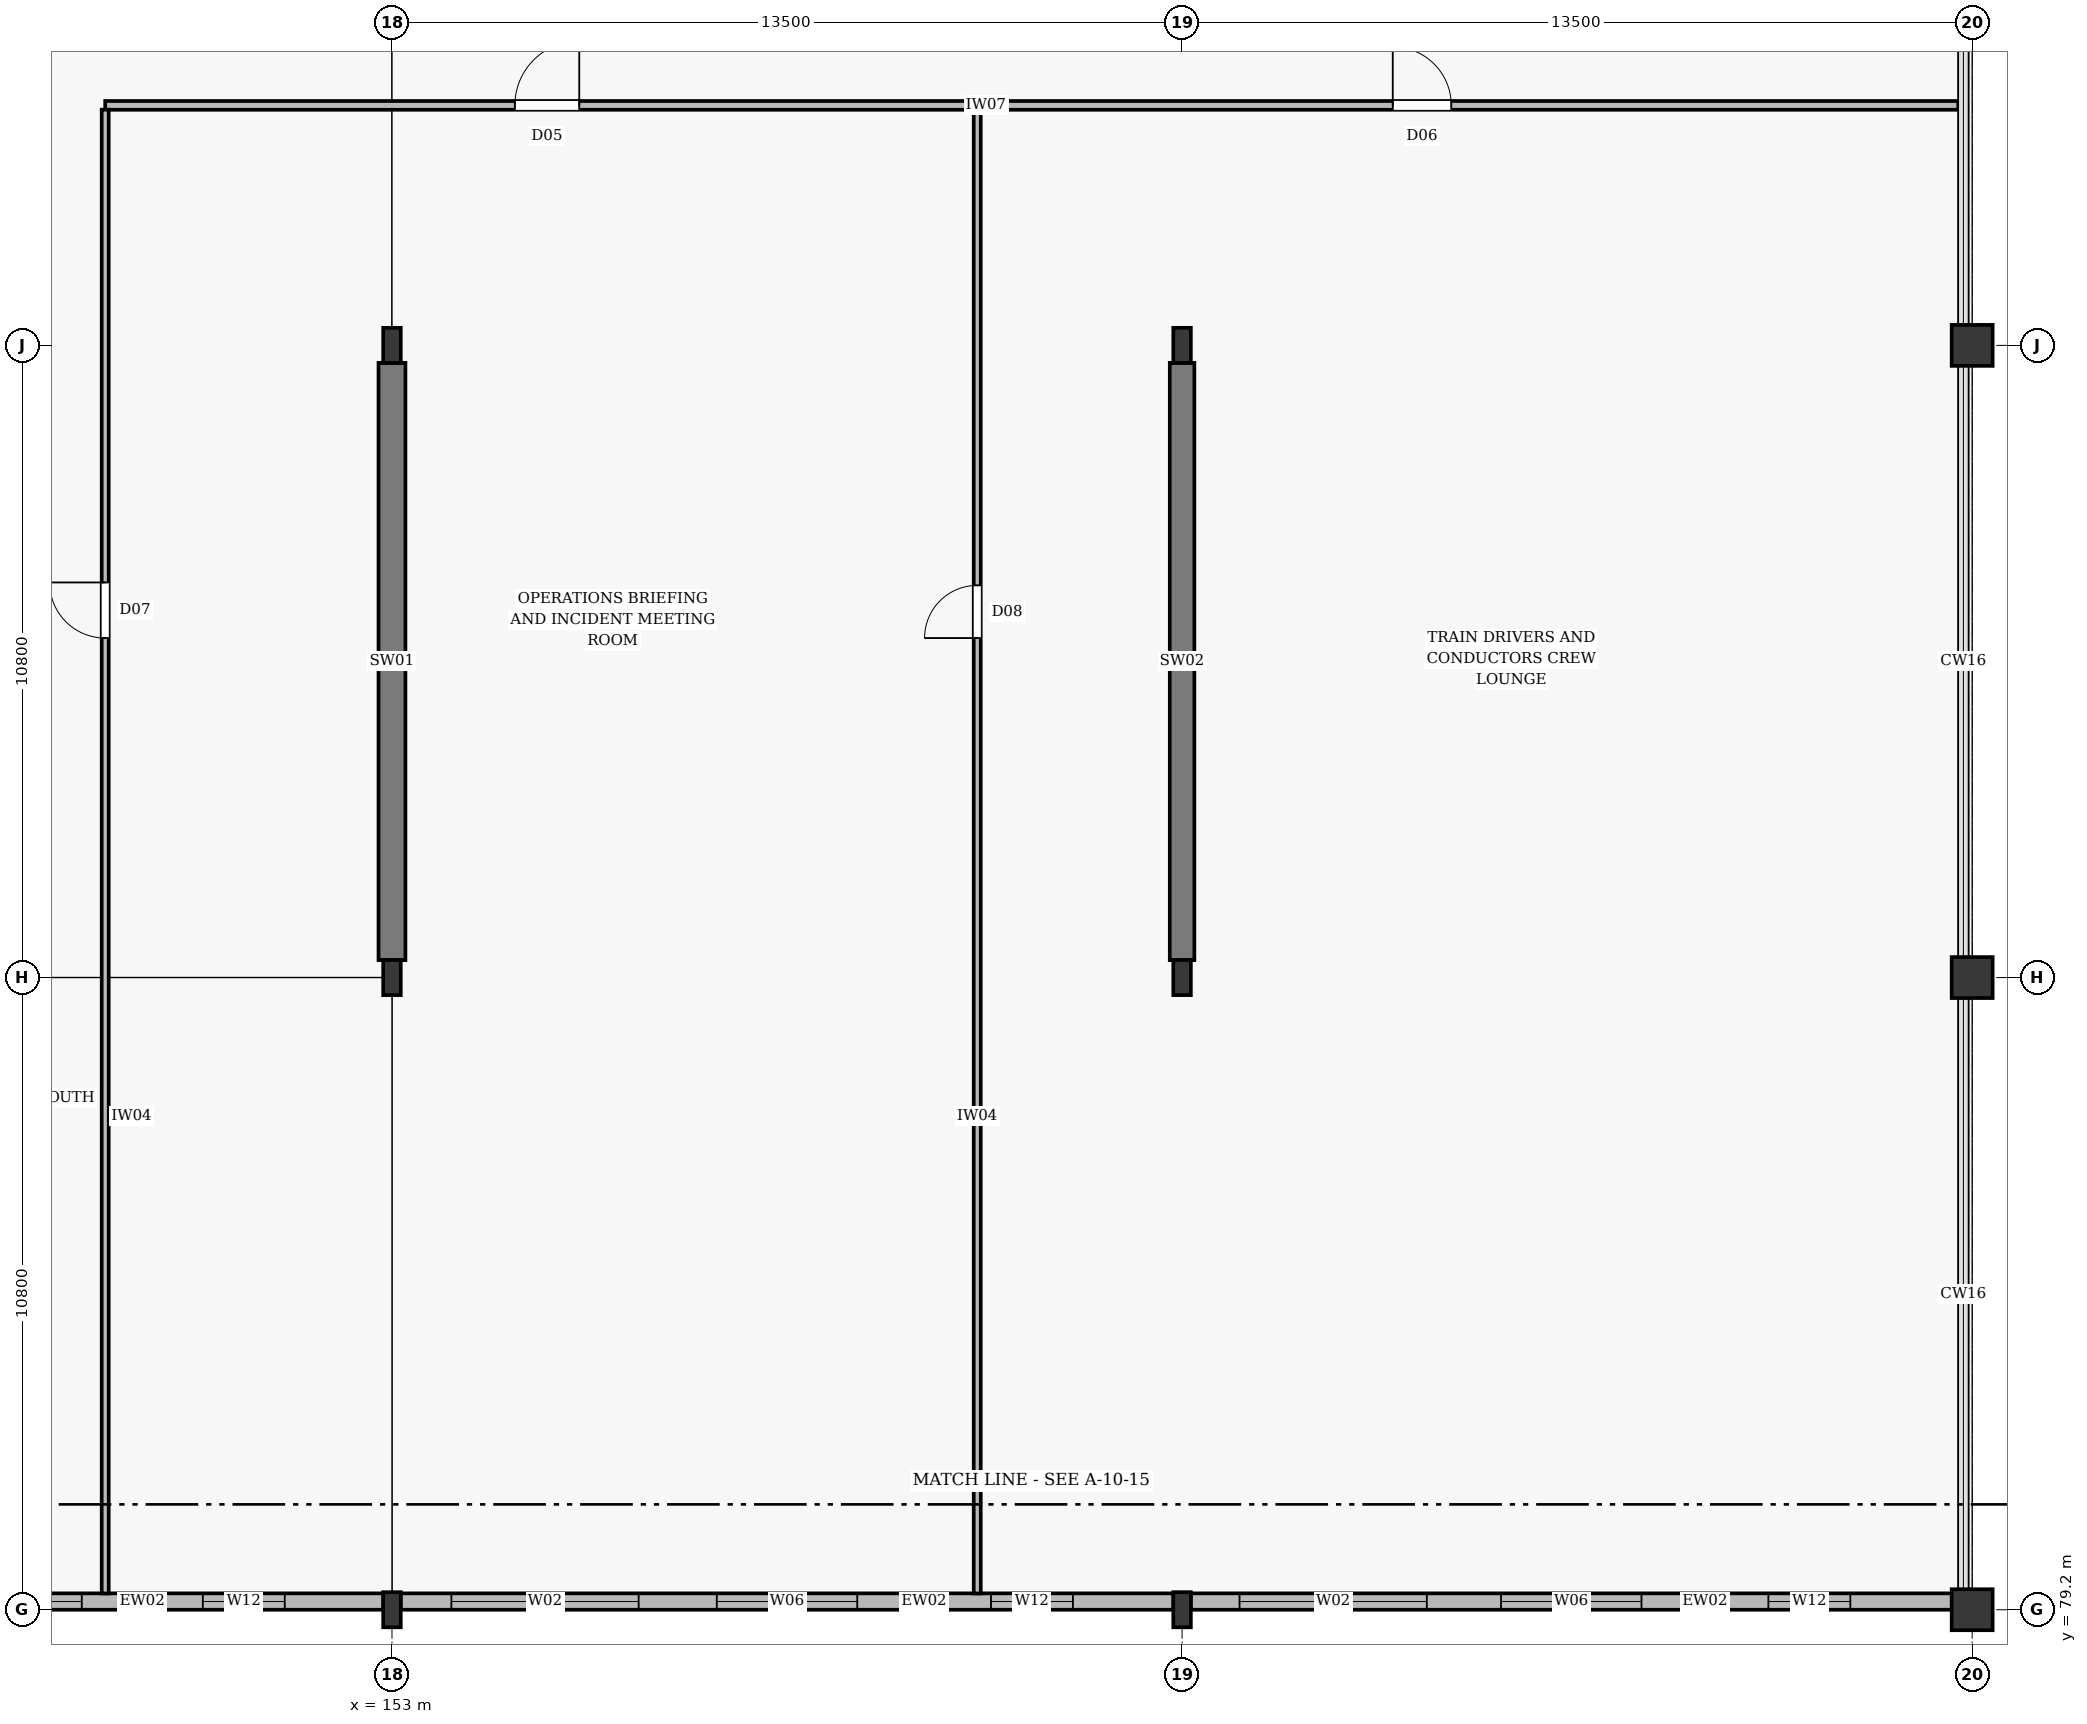
"""IFC4 building model, lengths in metres.
Left out: names, types, materials, properties, quantities, classifications, styles, units other than length and angle.
Written with IfcOpenShell. Run it as: python <this file> out.ifc"""

import sys

from ifc_helpers import new_model, si_unit, direction, frame, frame_2d, origin, origin_2d, place, context, subcontext, project, spatial, rectangle, i_section, extrude, element, fill, save


model = new_model("IFC4")
c1 = context("Model", 3, precision=1e-05, world=origin(), true_north=direction((0.0, 1.0)))
c2 = subcontext(c1, "Body", "Model", "MODEL_VIEW")
j1 = project(units=[si_unit("LENGTHUNIT", "METRE"), si_unit("PLANEANGLEUNIT", "RADIAN")], contexts=[c1])
p1 = place(None, origin())
s1 = spatial("IfcSite", under=j1, at=p1, CompositionType="ELEMENT")
p2 = place(p1, origin())
s2 = spatial("IfcBuilding", under=s1, at=p2, CompositionType="ELEMENT")
p3 = place(p2, frame((0.0, 0.0, 6.6)))
s3 = spatial("IfcBuildingStorey", under=s2, at=p3, CompositionType="ELEMENT", Elevation=6.6)
for number, where, z_axis, x_axis in (
    (1, (153.0, 79.2, 0.0), (0.0, 0.0, 1.0), (1.0, 0.0, 0.0)),
    (2, (153.0, 90.0, 0.0), (0.0, 0.0, 1.0), (1.0, 0.0, 0.0)),
    (3, (153.0, 100.8, 0.0), (0.0, 0.0, 1.0), (1.0, 0.0, 0.0)),
    (4, (166.5, 79.2, 0.0), (0.0, 0.0, 1.0), (1.0, 0.0, 0.0)),
    (5, (166.5, 90.0, 0.0), (0.0, 0.0, 1.0), (1.0, 0.0, 0.0)),
    (6, (166.5, 100.8, 0.0), (0.0, 0.0, 1.0), (1.0, 0.0, 0.0)),
):
    element("IfcColumn", number, at=place(p3, frame(where, z_axis=z_axis, x_axis=x_axis)), inside=s3, PredefinedType="COLUMN", context=c2, shape_type="SweptSolid", body=[
        extrude(i_section(OverallWidth=0.3, OverallDepth=0.6, WebThickness=0.015, FlangeThickness=0.029, at=origin_2d()), origin(), (0.0, 0.0, 1.0), 6.0),
    ])
for number, where, z_axis, x_axis in (
    (7, (180.0, 79.2, 0.0), (0.0, 0.0, 1.0), (1.0, 0.0, 0.0)),
    (8, (180.0, 90.0, 0.0), (0.0, 0.0, 1.0), (1.0, 0.0, 0.0)),
    (9, (180.0, 100.8, 0.0), (0.0, 0.0, 1.0), (1.0, 0.0, 0.0)),
):
    element("IfcColumn", number, at=place(p3, frame(where, z_axis=z_axis, x_axis=x_axis)), inside=s3, PredefinedType="COLUMN", context=c2, shape_type="SweptSolid", body=[
        extrude(rectangle(XDim=0.7, YDim=0.7, at=origin_2d()), origin(), (0.0, 0.0, 1.0), 6.0),
    ])
p4 = place(p3, frame((153.0, 90.298, 0.0), z_axis=(0.0, 0.0, 1.0), x_axis=(0.0, 1.0, 0.0)))
e10 = element("IfcWall", 10, at=p4, inside=s3, PredefinedType="SHEAR", context=c2, shape_type="SweptSolid", body=[
    extrude(rectangle(XDim=10.204, YDim=0.46, at=frame_2d((5.102, 0.0))), origin(), (0.0, 0.0, 1.0), 5.75),
])
p5 = place(p3, frame((166.5, 90.298, 0.0), z_axis=(0.0, 0.0, 1.0), x_axis=(0.0, 1.0, 0.0)))
e11 = element("IfcWall", 11, at=p5, inside=s3, PredefinedType="SHEAR", context=c2, shape_type="SweptSolid", body=[
    extrude(rectangle(XDim=10.204, YDim=0.42, at=frame_2d((5.102, 0.0))), origin(), (0.0, 0.0, 1.0), 5.75),
])
p6 = place(p3, frame((140.148, 79.34, 0.0), z_axis=(0.0, 0.0, 1.0), x_axis=(1.0, 0.0, 0.0)))
e12 = element("IfcWall", 12, at=p6, inside=s3, PredefinedType="STANDARD", context=c2, shape_type="SweptSolid", body=[
    extrude(rectangle(XDim=12.704, YDim=0.28, at=frame_2d((6.352, 0.0))), origin(), (0.0, 0.0, 1.0), 5.09),
])
p7 = place(p6, frame((0.684, 0.0, 0.75)))
e13 = element("IfcOpeningElement", 13, at=p7, cuts=e12, PredefinedType="OPENING", context=c2, shape_type="SweptSolid", body=[
    extrude(rectangle(XDim=3.2, YDim=2.8, at=frame_2d((1.6, 1.4))), frame((0.0, 0.152, 0.0), z_axis=(0.0, -1.0, 0.0), x_axis=(1.0, 0.0, 0.0)), (0.0, 0.0, 1.0), 0.304),
])
p8 = place(p6, frame((5.152, 0.0, 0.75)))
e14 = element("IfcOpeningElement", 14, at=p8, cuts=e12, PredefinedType="OPENING", context=c2, shape_type="SweptSolid", body=[
    extrude(rectangle(XDim=2.4, YDim=2.4, at=frame_2d((1.2, 1.2))), frame((0.0, 0.152, 0.0), z_axis=(0.0, -1.0, 0.0), x_axis=(1.0, 0.0, 0.0)), (0.0, 0.0, 1.0), 0.304),
])
p9 = place(p6, frame((9.62, 0.0, 1.05)))
e15 = element("IfcOpeningElement", 15, at=p9, cuts=e12, PredefinedType="OPENING", context=c2, shape_type="SweptSolid", body=[
    extrude(rectangle(XDim=1.4, YDim=1.8, at=frame_2d((0.7, 0.9))), frame((0.0, 0.152, 0.0), z_axis=(0.0, -1.0, 0.0), x_axis=(1.0, 0.0, 0.0)), (0.0, 0.0, 1.0), 0.304),
])
p10 = place(p3, frame((153.148, 79.34, 0.0), z_axis=(0.0, 0.0, 1.0), x_axis=(1.0, 0.0, 0.0)))
e16 = element("IfcWall", 16, at=p10, inside=s3, PredefinedType="STANDARD", context=c2, shape_type="SweptSolid", body=[
    extrude(rectangle(XDim=13.204, YDim=0.28, at=frame_2d((6.602, 0.0))), origin(), (0.0, 0.0, 1.0), 5.09),
])
p11 = place(p10, frame((0.867, 0.0, 0.75)))
e17 = element("IfcOpeningElement", 17, at=p11, cuts=e16, PredefinedType="OPENING", context=c2, shape_type="SweptSolid", body=[
    extrude(rectangle(XDim=3.2, YDim=2.8, at=frame_2d((1.6, 1.4))), frame((0.0, 0.152, 0.0), z_axis=(0.0, -1.0, 0.0), x_axis=(1.0, 0.0, 0.0)), (0.0, 0.0, 1.0), 0.304),
])
p12 = place(p10, frame((5.402, 0.0, 0.75)))
e18 = element("IfcOpeningElement", 18, at=p12, cuts=e16, PredefinedType="OPENING", context=c2, shape_type="SweptSolid", body=[
    extrude(rectangle(XDim=2.4, YDim=2.4, at=frame_2d((1.2, 1.2))), frame((0.0, 0.152, 0.0), z_axis=(0.0, -1.0, 0.0), x_axis=(1.0, 0.0, 0.0)), (0.0, 0.0, 1.0), 0.304),
])
p13 = place(p10, frame((10.087, 0.0, 1.05)))
e19 = element("IfcOpeningElement", 19, at=p13, cuts=e16, PredefinedType="OPENING", context=c2, shape_type="SweptSolid", body=[
    extrude(rectangle(XDim=1.4, YDim=1.8, at=frame_2d((0.7, 0.9))), frame((0.0, 0.152, 0.0), z_axis=(0.0, -1.0, 0.0), x_axis=(1.0, 0.0, 0.0)), (0.0, 0.0, 1.0), 0.304),
])
p14 = place(p3, frame((166.648, 79.34, 0.0), z_axis=(0.0, 0.0, 1.0), x_axis=(1.0, 0.0, 0.0)))
e20 = element("IfcWall", 20, at=p14, inside=s3, PredefinedType="STANDARD", context=c2, shape_type="SweptSolid", body=[
    extrude(rectangle(XDim=13.004, YDim=0.28, at=frame_2d((6.502, 0.0))), origin(), (0.0, 0.0, 1.0), 5.09),
])
p15 = place(p14, frame((0.834, 0.0, 0.75)))
e21 = element("IfcOpeningElement", 21, at=p15, cuts=e20, PredefinedType="OPENING", context=c2, shape_type="SweptSolid", body=[
    extrude(rectangle(XDim=3.2, YDim=2.8, at=frame_2d((1.6, 1.4))), frame((0.0, 0.152, 0.0), z_axis=(0.0, -1.0, 0.0), x_axis=(1.0, 0.0, 0.0)), (0.0, 0.0, 1.0), 0.304),
])
p16 = place(p14, frame((5.302, 0.0, 0.75)))
e22 = element("IfcOpeningElement", 22, at=p16, cuts=e20, PredefinedType="OPENING", context=c2, shape_type="SweptSolid", body=[
    extrude(rectangle(XDim=2.4, YDim=2.4, at=frame_2d((1.2, 1.2))), frame((0.0, 0.152, 0.0), z_axis=(0.0, -1.0, 0.0), x_axis=(1.0, 0.0, 0.0)), (0.0, 0.0, 1.0), 0.304),
])
p17 = place(p14, frame((9.87, 0.0, 1.05)))
e23 = element("IfcOpeningElement", 23, at=p17, cuts=e20, PredefinedType="OPENING", context=c2, shape_type="SweptSolid", body=[
    extrude(rectangle(XDim=1.4, YDim=1.8, at=frame_2d((0.7, 0.9))), frame((0.0, 0.152, 0.0), z_axis=(0.0, -1.0, 0.0), x_axis=(1.0, 0.0, 0.0)), (0.0, 0.0, 1.0), 0.304),
])
p18 = place(p3, frame((148.1, 104.9, 0.0), z_axis=(0.0, 0.0, 1.0), x_axis=(1.0, 0.0, 0.0)))
e24 = element("IfcWall", 24, at=p18, inside=s3, PredefinedType="PARTITIONING", context=c2, shape_type="SweptSolid", body=[
    extrude(rectangle(XDim=31.662, YDim=0.15, at=frame_2d((15.831, 0.0))), origin(), (0.0, 0.0, 1.0), 5.29),
])
p19 = place(p18, frame((7.0, 0.0, 0.005)))
e25 = element("IfcOpeningElement", 25, at=p19, cuts=e24, PredefinedType="OPENING", context=c2, shape_type="SweptSolid", body=[
    extrude(rectangle(XDim=1.1, YDim=2.1, at=frame_2d((0.55, 1.05))), frame((0.0, 0.087, 0.0), z_axis=(0.0, -1.0, 0.0), x_axis=(1.0, 0.0, 0.0)), (0.0, 0.0, 1.0), 0.174),
])
p20 = place(p18, frame((22.0, 0.0, 0.005)))
e26 = element("IfcOpeningElement", 26, at=p20, cuts=e24, PredefinedType="OPENING", context=c2, shape_type="SweptSolid", body=[
    extrude(rectangle(XDim=1.0, YDim=2.1, at=frame_2d((0.5, 1.05))), frame((0.0, 0.087, 0.0), z_axis=(0.0, -1.0, 0.0), x_axis=(1.0, 0.0, 0.0)), (0.0, 0.0, 1.0), 0.174),
])
p21 = place(p3, frame((148.1, 79.478, 0.0), z_axis=(0.0, 0.0, 1.0), x_axis=(0.0, 1.0, 0.0)))
e27 = element("IfcWall", 27, at=p21, inside=s3, PredefinedType="PARTITIONING", context=c2, shape_type="SweptSolid", body=[
    extrude(rectangle(XDim=25.349, YDim=0.12, at=frame_2d((12.674, 0.0))), origin(), (0.0, 0.0, 1.0), 5.14),
])
p22 = place(p21, frame((16.322, 0.0, 0.005)))
e28 = element("IfcOpeningElement", 28, at=p22, cuts=e27, PredefinedType="OPENING", context=c2, shape_type="SweptSolid", body=[
    extrude(rectangle(XDim=0.95, YDim=2.1, at=frame_2d((0.475, 1.05))), frame((0.0, 0.072, 0.0), z_axis=(0.0, -1.0, 0.0), x_axis=(1.0, 0.0, 0.0)), (0.0, 0.0, 1.0), 0.144),
])
p23 = place(p3, frame((163.0, 79.478, 0.0), z_axis=(0.0, 0.0, 1.0), x_axis=(0.0, 1.0, 0.0)))
e29 = element("IfcWall", 29, at=p23, inside=s3, PredefinedType="PARTITIONING", context=c2, shape_type="SweptSolid", body=[
    extrude(rectangle(XDim=25.349, YDim=0.12, at=frame_2d((12.674, 0.0))), origin(), (0.0, 0.0, 1.0), 5.14),
])
p24 = place(p23, frame((16.322, 0.0, 0.005)))
e30 = element("IfcOpeningElement", 30, at=p24, cuts=e29, PredefinedType="OPENING", context=c2, shape_type="SweptSolid", body=[
    extrude(rectangle(XDim=0.9, YDim=2.1, at=frame_2d((0.45, 1.05))), frame((0.0, 0.072, 0.0), z_axis=(0.0, -1.0, 0.0), x_axis=(1.0, 0.0, 0.0)), (0.0, 0.0, 1.0), 0.144),
])
p25 = place(p8, origin())
e31 = element("IfcWindow", 31, at=p25, inside=s3, PartitioningType="DOUBLE_PANEL_VERTICAL", PredefinedType="WINDOW", context=c2, shape_type="SweptSolid", body=[
    extrude(rectangle(XDim=2.4, YDim=2.4, at=frame_2d((1.2, 1.2))), frame((0.0, 0.03, 0.0), z_axis=(0.0, -1.0, 0.0), x_axis=(1.0, 0.0, 0.0)), (0.0, 0.0, 1.0), 0.06),
])
fill(e14, e31)
p26 = place(p9, origin())
e32 = element("IfcWindow", 32, at=p26, inside=s3, PartitioningType="DOUBLE_PANEL_VERTICAL", PredefinedType="WINDOW", context=c2, shape_type="SweptSolid", body=[
    extrude(rectangle(XDim=1.4, YDim=1.8, at=frame_2d((0.7, 0.9))), frame((0.0, 0.03, 0.0), z_axis=(0.0, -1.0, 0.0), x_axis=(1.0, 0.0, 0.0)), (0.0, 0.0, 1.0), 0.06),
])
fill(e15, e32)
p27 = place(p11, origin())
e33 = element("IfcWindow", 33, at=p27, inside=s3, PartitioningType="DOUBLE_PANEL_VERTICAL", PredefinedType="WINDOW", context=c2, shape_type="SweptSolid", body=[
    extrude(rectangle(XDim=3.2, YDim=2.8, at=frame_2d((1.6, 1.4))), frame((0.0, 0.03, 0.0), z_axis=(0.0, -1.0, 0.0), x_axis=(1.0, 0.0, 0.0)), (0.0, 0.0, 1.0), 0.06),
])
fill(e17, e33)
p28 = place(p12, origin())
e34 = element("IfcWindow", 34, at=p28, inside=s3, PartitioningType="DOUBLE_PANEL_VERTICAL", PredefinedType="WINDOW", context=c2, shape_type="SweptSolid", body=[
    extrude(rectangle(XDim=2.4, YDim=2.4, at=frame_2d((1.2, 1.2))), frame((0.0, 0.03, 0.0), z_axis=(0.0, -1.0, 0.0), x_axis=(1.0, 0.0, 0.0)), (0.0, 0.0, 1.0), 0.06),
])
fill(e18, e34)
p29 = place(p13, origin())
e35 = element("IfcWindow", 35, at=p29, inside=s3, PartitioningType="DOUBLE_PANEL_VERTICAL", PredefinedType="WINDOW", context=c2, shape_type="SweptSolid", body=[
    extrude(rectangle(XDim=1.4, YDim=1.8, at=frame_2d((0.7, 0.9))), frame((0.0, 0.03, 0.0), z_axis=(0.0, -1.0, 0.0), x_axis=(1.0, 0.0, 0.0)), (0.0, 0.0, 1.0), 0.06),
])
fill(e19, e35)
p30 = place(p15, origin())
e36 = element("IfcWindow", 36, at=p30, inside=s3, PartitioningType="DOUBLE_PANEL_VERTICAL", PredefinedType="WINDOW", context=c2, shape_type="SweptSolid", body=[
    extrude(rectangle(XDim=3.2, YDim=2.8, at=frame_2d((1.6, 1.4))), frame((0.0, 0.03, 0.0), z_axis=(0.0, -1.0, 0.0), x_axis=(1.0, 0.0, 0.0)), (0.0, 0.0, 1.0), 0.06),
])
fill(e21, e36)
p31 = place(p16, origin())
e37 = element("IfcWindow", 37, at=p31, inside=s3, PartitioningType="DOUBLE_PANEL_VERTICAL", PredefinedType="WINDOW", context=c2, shape_type="SweptSolid", body=[
    extrude(rectangle(XDim=2.4, YDim=2.4, at=frame_2d((1.2, 1.2))), frame((0.0, 0.03, 0.0), z_axis=(0.0, -1.0, 0.0), x_axis=(1.0, 0.0, 0.0)), (0.0, 0.0, 1.0), 0.06),
])
fill(e22, e37)
p32 = place(p17, origin())
e38 = element("IfcWindow", 38, at=p32, inside=s3, PartitioningType="DOUBLE_PANEL_VERTICAL", PredefinedType="WINDOW", context=c2, shape_type="SweptSolid", body=[
    extrude(rectangle(XDim=1.4, YDim=1.8, at=frame_2d((0.7, 0.9))), frame((0.0, 0.03, 0.0), z_axis=(0.0, -1.0, 0.0), x_axis=(1.0, 0.0, 0.0)), (0.0, 0.0, 1.0), 0.06),
])
fill(e23, e38)
p33 = place(p19, origin())
e39 = element("IfcDoor", 39, at=p33, inside=s3, OperationType="SINGLE_SWING_RIGHT", PredefinedType="DOOR", context=c2, shape_type="SweptSolid", body=[
    extrude(rectangle(XDim=1.1, YDim=2.1, at=frame_2d((0.55, 1.05))), frame((0.0, 0.025, 0.0), z_axis=(0.0, -1.0, 0.0), x_axis=(1.0, 0.0, 0.0)), (0.0, 0.0, 1.0), 0.05),
])
fill(e25, e39)
p34 = place(p20, origin())
e40 = element("IfcDoor", 40, at=p34, inside=s3, OperationType="SINGLE_SWING_LEFT", PredefinedType="DOOR", context=c2, shape_type="SweptSolid", body=[
    extrude(rectangle(XDim=1.0, YDim=2.1, at=frame_2d((0.5, 1.05))), frame((0.0, 0.025, 0.0), z_axis=(0.0, -1.0, 0.0), x_axis=(1.0, 0.0, 0.0)), (0.0, 0.0, 1.0), 0.05),
])
fill(e26, e40)
p35 = place(p22, origin())
e41 = element("IfcDoor", 41, at=p35, inside=s3, OperationType="SINGLE_SWING_RIGHT", PredefinedType="DOOR", context=c2, shape_type="SweptSolid", body=[
    extrude(rectangle(XDim=0.95, YDim=2.1, at=frame_2d((0.475, 1.05))), frame((0.0, 0.025, 0.0), z_axis=(0.0, -1.0, 0.0), x_axis=(1.0, 0.0, 0.0)), (0.0, 0.0, 1.0), 0.05),
])
fill(e28, e41)
p36 = place(p24, origin())
e42 = element("IfcDoor", 42, at=p36, inside=s3, OperationType="SINGLE_SWING_LEFT", PredefinedType="DOOR", context=c2, shape_type="SweptSolid", body=[
    extrude(rectangle(XDim=0.9, YDim=2.1, at=frame_2d((0.45, 1.05))), frame((0.0, 0.025, 0.0), z_axis=(0.0, -1.0, 0.0), x_axis=(1.0, 0.0, 0.0)), (0.0, 0.0, 1.0), 0.05),
])
fill(e30, e42)
save(model, sys.argv[1])
